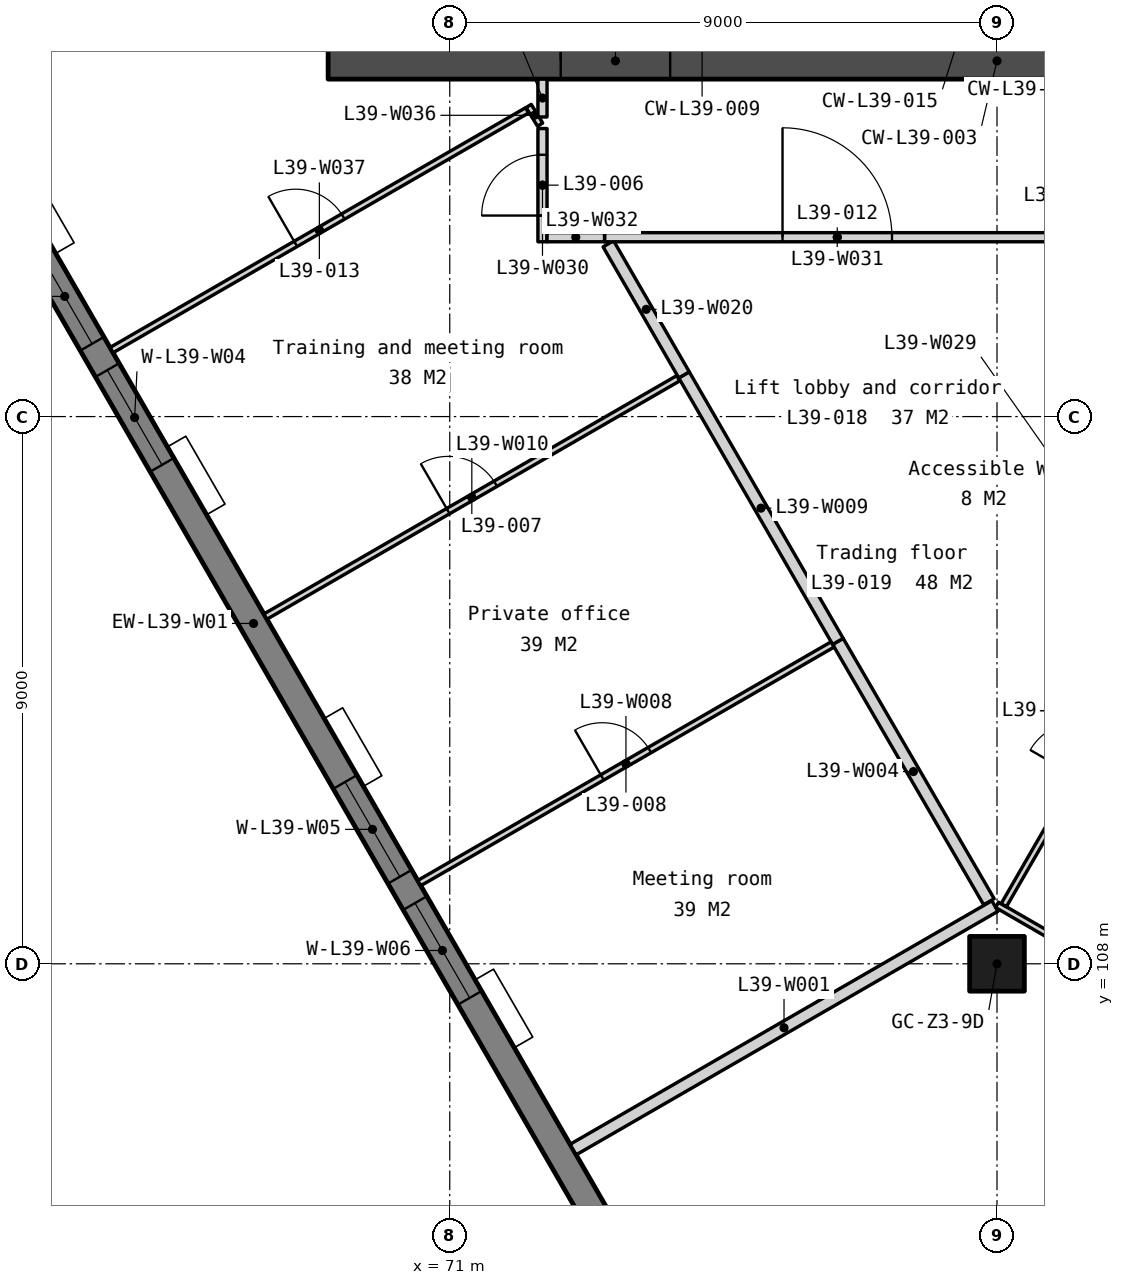
"""IFC4 building model, lengths in metres.
Left out: names, types, materials, properties, quantities, classifications, styles, units other than length and angle.
Written with IfcOpenShell. Run it as: python <this file> out.ifc"""

import sys

from ifc_helpers import new_model, si_unit, direction, frame, frame_2d, origin, origin_2d, place, context, subcontext, project, spatial, polyline, rectangle, outline, extrude, element, fill, save


model = new_model("IFC4")
c1 = context("Model", 3, precision=1e-05, world=origin(), true_north=direction((0.0, 1.0)))
c2 = subcontext(c1, "Body", "Model", "MODEL_VIEW")
j1 = project(units=[si_unit("LENGTHUNIT", "METRE"), si_unit("PLANEANGLEUNIT", "RADIAN")], contexts=[c1])
p1 = place(None, origin())
s1 = spatial("IfcSite", under=j1, at=p1, CompositionType="ELEMENT")
p2 = place(p1, origin())
s2 = spatial("IfcBuilding", under=s1, at=p2, CompositionType="ELEMENT")
p3 = place(p2, frame((0.0, 0.0, 155.9)))
s3 = spatial("IfcBuildingStorey", under=s2, at=p3, CompositionType="ELEMENT", Elevation=155.9)
p4 = place(p3, frame((80.0, 108.0, 0.0), z_axis=(0.0, 0.0, 1.0), x_axis=(1.0, 0.0, 0.0)))
e1 = element("IfcColumn", 1, at=p4, inside=s3, PredefinedType="COLUMN", context=c2, shape_type="SweptSolid", body=[
    extrude(rectangle(XDim=0.9, YDim=0.9, at=origin_2d()), origin(), (0.0, 0.0, 1.0), 3.9),
])
p5 = place(p3, frame((69.0, 122.85, 0.0), z_axis=(0.0, 0.0, 1.0), x_axis=(1.0, 0.0, 0.0)))
e2 = element("IfcWall", 2, at=p5, inside=s3, PredefinedType="SOLIDWALL", context=c2, shape_type="SweptSolid", body=[
    extrude(rectangle(XDim=22.0, YDim=0.6, at=frame_2d((11.0, 0.0))), origin(), (0.0, 0.0, 1.0), 3.75),
])
p6 = place(p5, frame((16.375, 0.0, 0.0)))
e3 = element("IfcOpeningElement", 3, at=p6, cuts=e2, PredefinedType="OPENING", context=c2, shape_type="SweptSolid", body=[
    extrude(rectangle(XDim=1.8, YDim=2.1, at=frame_2d((0.9, 1.05))), frame((0.0, 0.31, 0.0), z_axis=(0.0, -1.0, 0.0), x_axis=(1.0, 0.0, 0.0)), (0.0, 0.0, 1.0), 0.62),
])
p7 = place(p5, frame((3.825, 0.0, 0.0)))
e4 = element("IfcOpeningElement", 4, at=p7, cuts=e2, PredefinedType="OPENING", context=c2, shape_type="SweptSolid", body=[
    extrude(rectangle(XDim=1.8, YDim=2.1, at=frame_2d((0.9, 1.05))), frame((0.0, 0.31, 0.0), z_axis=(0.0, -1.0, 0.0), x_axis=(1.0, 0.0, 0.0)), (0.0, 0.0, 1.0), 0.62),
])
p8 = place(p5, frame((12.85, 0.0, 0.0)))
e5 = element("IfcOpeningElement", 5, at=p8, cuts=e2, PredefinedType="OPENING", context=c2, shape_type="SweptSolid", body=[
    extrude(rectangle(XDim=1.5, YDim=2.1, at=frame_2d((0.75, 1.05))), frame((0.0, 0.31, 0.0), z_axis=(0.0, -1.0, 0.0), x_axis=(1.0, 0.0, 0.0)), (0.0, 0.0, 1.0), 0.62),
])
p9 = place(p3, frame((57.652, 131.129, -0.15), z_axis=(0.0, 0.0, 1.0), x_axis=(0.499997369791, -0.866026922331, 0.0)))
e6 = element("IfcWall", 6, at=p9, inside=s3, PredefinedType="SOLIDWALL", context=c2, shape_type="SweptSolid", body=[
    extrude(outline(polyline([(40.486, 0.0), (40.486, 3.9), (0.0, 3.9), (0.0, 0.0), (40.486, 0.0)])), frame((0.0, 0.225, 0.0), z_axis=(0.0, -1.0, 0.0), x_axis=(1.0, 0.0, 0.0)), (0.0, 0.0, 1.0), 0.45),
])
p10 = place(p9, frame((3.011, 0.0, 0.95)))
e7 = element("IfcOpeningElement", 7, at=p10, cuts=e6, PredefinedType="OPENING", context=c2, shape_type="SweptSolid", body=[
    extrude(rectangle(XDim=1.8, YDim=2.2, at=frame_2d((0.9, 1.1))), frame((0.0, 0.235, 0.0), z_axis=(0.0, -1.0, 0.0), x_axis=(1.0, 0.0, 0.0)), (0.0, 0.0, 1.0), 0.47),
])
p11 = place(p9, frame((5.311, 0.0, 0.95)))
e8 = element("IfcOpeningElement", 8, at=p11, cuts=e6, PredefinedType="OPENING", context=c2, shape_type="SweptSolid", body=[
    extrude(rectangle(XDim=1.8, YDim=2.2, at=frame_2d((0.9, 1.1))), frame((0.0, 0.235, 0.0), z_axis=(0.0, -1.0, 0.0), x_axis=(1.0, 0.0, 0.0)), (0.0, 0.0, 1.0), 0.47),
])
p12 = place(p9, frame((13.132, 0.0, 0.95)))
e9 = element("IfcOpeningElement", 9, at=p12, cuts=e6, PredefinedType="OPENING", context=c2, shape_type="SweptSolid", body=[
    extrude(rectangle(XDim=1.8, YDim=2.2, at=frame_2d((0.9, 1.1))), frame((0.0, 0.235, 0.0), z_axis=(0.0, -1.0, 0.0), x_axis=(1.0, 0.0, 0.0)), (0.0, 0.0, 1.0), 0.47),
])
p13 = place(p9, frame((15.432, 0.0, 0.95)))
e10 = element("IfcOpeningElement", 10, at=p13, cuts=e6, PredefinedType="OPENING", context=c2, shape_type="SweptSolid", body=[
    extrude(rectangle(XDim=1.8, YDim=2.2, at=frame_2d((0.9, 1.1))), frame((0.0, 0.235, 0.0), z_axis=(0.0, -1.0, 0.0), x_axis=(1.0, 0.0, 0.0)), (0.0, 0.0, 1.0), 0.47),
])
p14 = place(p9, frame((23.254, 0.0, 0.95)))
e11 = element("IfcOpeningElement", 11, at=p14, cuts=e6, PredefinedType="OPENING", context=c2, shape_type="SweptSolid", body=[
    extrude(rectangle(XDim=1.8, YDim=2.2, at=frame_2d((0.9, 1.1))), frame((0.0, 0.235, 0.0), z_axis=(0.0, -1.0, 0.0), x_axis=(1.0, 0.0, 0.0)), (0.0, 0.0, 1.0), 0.47),
])
p15 = place(p9, frame((25.554, 0.0, 0.95)))
e12 = element("IfcOpeningElement", 12, at=p15, cuts=e6, PredefinedType="OPENING", context=c2, shape_type="SweptSolid", body=[
    extrude(rectangle(XDim=1.8, YDim=2.2, at=frame_2d((0.9, 1.1))), frame((0.0, 0.235, 0.0), z_axis=(0.0, -1.0, 0.0), x_axis=(1.0, 0.0, 0.0)), (0.0, 0.0, 1.0), 0.47),
])
p16 = place(p9, frame((33.375, 0.0, 0.95)))
e13 = element("IfcOpeningElement", 13, at=p16, cuts=e6, PredefinedType="OPENING", context=c2, shape_type="SweptSolid", body=[
    extrude(rectangle(XDim=1.8, YDim=2.2, at=frame_2d((0.9, 1.1))), frame((0.0, 0.235, 0.0), z_axis=(0.0, -1.0, 0.0), x_axis=(1.0, 0.0, 0.0)), (0.0, 0.0, 1.0), 0.47),
])
p17 = place(p9, frame((35.675, 0.0, 0.95)))
e14 = element("IfcOpeningElement", 14, at=p17, cuts=e6, PredefinedType="OPENING", context=c2, shape_type="SweptSolid", body=[
    extrude(rectangle(XDim=1.8, YDim=2.2, at=frame_2d((0.9, 1.1))), frame((0.0, 0.235, 0.0), z_axis=(0.0, -1.0, 0.0), x_axis=(1.0, 0.0, 0.0)), (0.0, 0.0, 1.0), 0.47),
])
p18 = place(p3, frame((73.029, 104.945, 0.0), z_axis=(0.0, 0.0, 1.0), x_axis=(0.866028745538, 0.499994211868, 0.0)))
e15 = element("IfcWall", 15, at=p18, inside=s3, PredefinedType="PARTITIONING", context=c2, shape_type="SweptSolid", body=[
    extrude(rectangle(XDim=8.01, YDim=0.2, at=frame_2d((4.005, 0.0))), origin(), (0.0, 0.0, 1.0), 3.75),
])
p19 = place(p3, frame((77.384, 113.302, 0.0), z_axis=(0.0, 0.0, 1.0), x_axis=(0.501726207978, -0.865026480651, 0.0)))
e16 = element("IfcWall", 16, at=p19, inside=s3, PredefinedType="PARTITIONING", context=c2, shape_type="SweptSolid", body=[
    extrude(rectangle(XDim=4.951, YDim=0.2, at=frame_2d((2.475, 0.0))), origin(), (0.0, 0.0, 1.0), 3.75),
])
p20 = place(p3, frame((80.0, 108.969, 0.0), z_axis=(0.0, 0.0, 1.0), x_axis=(0.86602648383, -0.499998129301, 0.0)))
e17 = element("IfcWall", 17, at=p20, inside=s3, PredefinedType="PARTITIONING", context=c2, shape_type="SweptSolid", body=[
    extrude(rectangle(XDim=8.049, YDim=0.1, at=frame_2d((4.025, 0.0))), origin(), (0.0, 0.0, 1.0), 3.75),
])
p21 = place(p20, frame((3.575, 0.0, 0.0)))
e18 = element("IfcOpeningElement", 18, at=p21, cuts=e17, PredefinedType="OPENING", context=c2, shape_type="SweptSolid", body=[
    extrude(rectangle(XDim=0.9, YDim=2.1, at=frame_2d((0.45, 1.05))), frame((0.0, 0.06, 0.0), z_axis=(0.0, -1.0, 0.0), x_axis=(1.0, 0.0, 0.0)), (0.0, 0.0, 1.0), 0.12),
])
p22 = place(p3, frame((70.499, 109.327, 0.0), z_axis=(0.0, 0.0, 1.0), x_axis=(0.86602399778, 0.500002435262, 0.0)))
e19 = element("IfcWall", 19, at=p22, inside=s3, PredefinedType="PARTITIONING", context=c2, shape_type="SweptSolid", body=[
    extrude(rectangle(XDim=7.85, YDim=0.1, at=frame_2d((3.925, 0.0))), origin(), (0.0, 0.0, 1.0), 3.75),
])
p23 = place(p22, frame((3.475, 0.0, 0.0)))
e20 = element("IfcOpeningElement", 20, at=p23, cuts=e19, PredefinedType="OPENING", context=c2, shape_type="SweptSolid", body=[
    extrude(rectangle(XDim=0.9, YDim=2.1, at=frame_2d((0.45, 1.05))), frame((0.0, 0.06, 0.0), z_axis=(0.0, -1.0, 0.0), x_axis=(1.0, 0.0, 0.0)), (0.0, 0.0, 1.0), 0.12),
])
p24 = place(p3, frame((74.853, 117.685, 0.0), z_axis=(0.0, 0.0, 1.0), x_axis=(0.500014760403, -0.866016881694, 0.0)))
e21 = element("IfcWall", 21, at=p24, inside=s3, PredefinedType="PARTITIONING", context=c2, shape_type="SweptSolid", body=[
    extrude(rectangle(XDim=5.061, YDim=0.2, at=frame_2d((2.53, 0.0))), origin(), (0.0, 0.0, 1.0), 3.75),
])
p25 = place(p3, frame((67.968, 113.71, 0.0), z_axis=(0.0, 0.0, 1.0), x_axis=(0.866013415921, 0.500020763015, 0.0)))
e22 = element("IfcWall", 22, at=p25, inside=s3, PredefinedType="PARTITIONING", context=c2, shape_type="SweptSolid", body=[
    extrude(rectangle(XDim=7.84, YDim=0.1, at=frame_2d((3.92, 0.0))), origin(), (0.0, 0.0, 1.0), 3.75),
])
p26 = place(p25, frame((3.47, 0.0, 0.0)))
e23 = element("IfcOpeningElement", 23, at=p26, cuts=e22, PredefinedType="OPENING", context=c2, shape_type="SweptSolid", body=[
    extrude(rectangle(XDim=0.9, YDim=2.1, at=frame_2d((0.45, 1.05))), frame((0.0, 0.06, 0.0), z_axis=(0.0, -1.0, 0.0), x_axis=(1.0, 0.0, 0.0)), (0.0, 0.0, 1.0), 0.12),
])
p27 = place(p3, frame((80.111, 108.963, 0.0), z_axis=(0.0, 0.0, 1.0), x_axis=(0.500033177651, 0.866006247812, 0.0)))
e24 = element("IfcWall", 24, at=p27, inside=s3, PredefinedType="PARTITIONING", context=c2, shape_type="SweptSolid", body=[
    extrude(rectangle(XDim=5.758, YDim=0.1, at=frame_2d((2.879, 0.0))), origin(), (0.0, 0.0, 1.0), 3.75),
])
p28 = place(p27, frame((2.429, 0.0, 0.0)))
e25 = element("IfcOpeningElement", 25, at=p28, cuts=e24, PredefinedType="OPENING", context=c2, shape_type="SweptSolid", body=[
    extrude(rectangle(XDim=0.9, YDim=2.1, at=frame_2d((0.45, 1.05))), frame((0.0, 0.06, 0.0), z_axis=(0.0, -1.0, 0.0), x_axis=(1.0, 0.0, 0.0)), (0.0, 0.0, 1.0), 0.12),
])
p29 = place(p3, frame((73.608, 119.842, 0.0), z_axis=(0.0, 0.0, 1.0), x_axis=(0.50001949124, -0.86601415022, 0.0)))
e26 = element("IfcWall", 26, at=p29, inside=s3, PredefinedType="PARTITIONING", context=c2, shape_type="SweptSolid", body=[
    extrude(rectangle(XDim=2.49, YDim=0.2, at=frame_2d((1.245, 0.0))), origin(), (0.0, 0.0, 1.0), 3.75),
])
p30 = place(p3, frame((72.525, 119.875, 0.0), z_axis=(0.0, 0.0, 1.0), x_axis=(0.0, 1.0, 0.0)))
e27 = element("IfcWall", 27, at=p30, inside=s3, PredefinedType="PARTITIONING", context=c2, shape_type="SweptSolid", body=[
    extrude(rectangle(XDim=1.863, YDim=0.15, at=frame_2d((0.931, 0.0))), origin(), (0.0, 0.0, 1.0), 3.75),
])
p31 = place(p30, frame((0.431, 0.0, 0.0)))
e28 = element("IfcOpeningElement", 28, at=p31, cuts=e27, PredefinedType="OPENING", context=c2, shape_type="SweptSolid", body=[
    extrude(rectangle(XDim=1.0, YDim=2.1, at=frame_2d((0.5, 1.05))), frame((0.0, 0.085, 0.0), z_axis=(0.0, -1.0, 0.0), x_axis=(1.0, 0.0, 0.0)), (0.0, 0.0, 1.0), 0.17),
])
p32 = place(p3, frame((73.545, 119.95, 0.0), z_axis=(0.0, 0.0, 1.0), x_axis=(1.0, 0.0, 0.0)))
e29 = element("IfcWall", 29, at=p32, inside=s3, PredefinedType="PARTITIONING", context=c2, shape_type="SweptSolid", body=[
    extrude(rectangle(XDim=7.655, YDim=0.15, at=frame_2d((3.827, 0.0))), origin(), (0.0, 0.0, 1.0), 3.75),
])
p33 = place(p32, frame((2.927, 0.0, 0.0)))
e30 = element("IfcOpeningElement", 30, at=p33, cuts=e29, PredefinedType="OPENING", context=c2, shape_type="SweptSolid", body=[
    extrude(rectangle(XDim=1.8, YDim=2.1, at=frame_2d((0.9, 1.05))), frame((0.0, 0.085, 0.0), z_axis=(0.0, -1.0, 0.0), x_axis=(1.0, 0.0, 0.0)), (0.0, 0.0, 1.0), 0.17),
])
p34 = place(p3, frame((72.6, 119.95, 0.0), z_axis=(0.0, 0.0, 1.0), x_axis=(1.0, 0.0, 0.0)))
e31 = element("IfcWall", 31, at=p34, inside=s3, PredefinedType="PARTITIONING", context=c2, shape_type="SweptSolid", body=[
    extrude(rectangle(XDim=0.945, YDim=0.15, at=frame_2d((0.473, 0.0))), origin(), (0.0, 0.0, 1.0), 3.75),
])
p35 = place(p3, frame((72.298, 122.109, 0.0), z_axis=(0.0, 0.0, 1.0), x_axis=(0.522244349168, -0.852795895723, 0.0)))
e32 = element("IfcWall", 32, at=p35, inside=s3, PredefinedType="PARTITIONING", context=c2, shape_type="SweptSolid", body=[
    extrude(rectangle(XDim=0.36, YDim=0.1, at=frame_2d((0.18, 0.0))), origin(), (0.0, 0.0, 1.0), 3.75),
])
p36 = place(p3, frame((65.439, 118.094, 0.0), z_axis=(0.0, 0.0, 1.0), x_axis=(0.866161367057, 0.499764430726, 0.0)))
e33 = element("IfcWall", 33, at=p36, inside=s3, PredefinedType="PARTITIONING", context=c2, shape_type="SweptSolid", body=[
    extrude(rectangle(XDim=7.888, YDim=0.1, at=frame_2d((3.944, 0.0))), origin(), (0.0, 0.0, 1.0), 3.75),
])
p37 = place(p36, frame((3.494, 0.0, 0.0)))
e34 = element("IfcOpeningElement", 34, at=p37, cuts=e33, PredefinedType="OPENING", context=c2, shape_type="SweptSolid", body=[
    extrude(rectangle(XDim=0.9, YDim=2.1, at=frame_2d((0.45, 1.05))), frame((0.0, 0.06, 0.0), z_axis=(0.0, -1.0, 0.0), x_axis=(1.0, 0.0, 0.0)), (0.0, 0.0, 1.0), 0.12),
])
p38 = place(p3, frame((72.525, 121.927, 0.0), z_axis=(0.0, 0.0, 1.0), x_axis=(0.0, 1.0, 0.0)))
e35 = element("IfcWall", 35, at=p38, inside=s3, PredefinedType="PARTITIONING", context=c2, shape_type="SweptSolid", body=[
    extrude(rectangle(XDim=0.622, YDim=0.15, at=frame_2d((0.311, 0.0))), origin(), (0.0, 0.0, 1.0), 3.75),
])
p39 = place(p7, origin())
e36 = element("IfcDoor", 36, at=p39, inside=s3, OperationType="DOUBLE_DOOR_DOUBLE_SWING", PredefinedType="DOOR", context=c2, shape_type="SweptSolid", body=[
    extrude(rectangle(XDim=1.8, YDim=2.1, at=frame_2d((0.9, 1.05))), frame((0.0, 0.025, 0.0), z_axis=(0.0, -1.0, 0.0), x_axis=(1.0, 0.0, 0.0)), (0.0, 0.0, 1.0), 0.05),
])
fill(e4, e36)
p40 = place(p12, origin())
e37 = element("IfcWindow", 37, at=p40, inside=s3, PartitioningType="SINGLE_PANEL", PredefinedType="WINDOW", context=c2, shape_type="SweptSolid", body=[
    extrude(rectangle(XDim=1.8, YDim=2.2, at=frame_2d((0.9, 1.1))), frame((0.0, 0.03, 0.0), z_axis=(0.0, -1.0, 0.0), x_axis=(1.0, 0.0, 0.0)), (0.0, 0.0, 1.0), 0.06),
])
fill(e9, e37)
p41 = place(p13, origin())
e38 = element("IfcWindow", 38, at=p41, inside=s3, PartitioningType="SINGLE_PANEL", PredefinedType="WINDOW", context=c2, shape_type="SweptSolid", body=[
    extrude(rectangle(XDim=1.8, YDim=2.2, at=frame_2d((0.9, 1.1))), frame((0.0, 0.03, 0.0), z_axis=(0.0, -1.0, 0.0), x_axis=(1.0, 0.0, 0.0)), (0.0, 0.0, 1.0), 0.06),
])
fill(e10, e38)
p42 = place(p14, origin())
e39 = element("IfcWindow", 39, at=p42, inside=s3, PartitioningType="SINGLE_PANEL", PredefinedType="WINDOW", context=c2, shape_type="SweptSolid", body=[
    extrude(rectangle(XDim=1.8, YDim=2.2, at=frame_2d((0.9, 1.1))), frame((0.0, 0.03, 0.0), z_axis=(0.0, -1.0, 0.0), x_axis=(1.0, 0.0, 0.0)), (0.0, 0.0, 1.0), 0.06),
])
fill(e11, e39)
p43 = place(p15, origin())
e40 = element("IfcWindow", 40, at=p43, inside=s3, PartitioningType="SINGLE_PANEL", PredefinedType="WINDOW", context=c2, shape_type="SweptSolid", body=[
    extrude(rectangle(XDim=1.8, YDim=2.2, at=frame_2d((0.9, 1.1))), frame((0.0, 0.03, 0.0), z_axis=(0.0, -1.0, 0.0), x_axis=(1.0, 0.0, 0.0)), (0.0, 0.0, 1.0), 0.06),
])
fill(e12, e40)
p44 = place(p31, origin())
e41 = element("IfcDoor", 41, at=p44, inside=s3, OperationType="SINGLE_SWING_LEFT", PredefinedType="DOOR", context=c2, shape_type="SweptSolid", body=[
    extrude(rectangle(XDim=1.0, YDim=2.1, at=frame_2d((0.5, 1.05))), frame((0.0, 0.025, 0.0), z_axis=(0.0, -1.0, 0.0), x_axis=(1.0, 0.0, 0.0)), (0.0, 0.0, 1.0), 0.05),
])
fill(e28, e41)
p45 = place(p26, origin())
e42 = element("IfcDoor", 42, at=p45, inside=s3, OperationType="SINGLE_SWING_LEFT", PredefinedType="DOOR", context=c2, shape_type="SweptSolid", body=[
    extrude(rectangle(XDim=0.9, YDim=2.1, at=frame_2d((0.45, 1.05))), frame((0.0, 0.025, 0.0), z_axis=(0.0, -1.0, 0.0), x_axis=(1.0, 0.0, 0.0)), (0.0, 0.0, 1.0), 0.05),
])
fill(e23, e42)
p46 = place(p23, origin())
e43 = element("IfcDoor", 43, at=p46, inside=s3, OperationType="SINGLE_SWING_LEFT", PredefinedType="DOOR", context=c2, shape_type="SweptSolid", body=[
    extrude(rectangle(XDim=0.9, YDim=2.1, at=frame_2d((0.45, 1.05))), frame((0.0, 0.025, 0.0), z_axis=(0.0, -1.0, 0.0), x_axis=(1.0, 0.0, 0.0)), (0.0, 0.0, 1.0), 0.05),
])
fill(e20, e43)
p47 = place(p33, origin())
e44 = element("IfcDoor", 44, at=p47, inside=s3, OperationType="SINGLE_SWING_LEFT", PredefinedType="DOOR", context=c2, shape_type="SweptSolid", body=[
    extrude(rectangle(XDim=1.8, YDim=2.1, at=frame_2d((0.9, 1.05))), frame((0.0, 0.025, 0.0), z_axis=(0.0, -1.0, 0.0), x_axis=(1.0, 0.0, 0.0)), (0.0, 0.0, 1.0), 0.05),
])
fill(e30, e44)
p48 = place(p37, origin())
e45 = element("IfcDoor", 45, at=p48, inside=s3, OperationType="SINGLE_SWING_LEFT", PredefinedType="DOOR", context=c2, shape_type="SweptSolid", body=[
    extrude(rectangle(XDim=0.9, YDim=2.1, at=frame_2d((0.45, 1.05))), frame((0.0, 0.025, 0.0), z_axis=(0.0, -1.0, 0.0), x_axis=(1.0, 0.0, 0.0)), (0.0, 0.0, 1.0), 0.05),
])
fill(e34, e45)
save(model, sys.argv[1])
